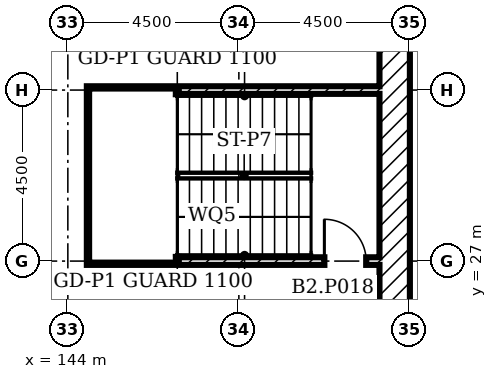
"""IFC4 building model, lengths in metres.
Left out: names, types, materials, properties, quantities, classifications, styles, units other than length and angle.
Written with IfcOpenShell. Run it as: python <this file> out.ifc"""

import sys

from ifc_helpers import new_model, si_unit, direction, frame, frame_2d, origin, place, context, subcontext, project, spatial, rectangle, extrude, element, fill, save


model = new_model("IFC4")
c1 = context("Model", 3, precision=1e-05, world=origin(), true_north=direction((0.0, 1.0)))
c2 = subcontext(c1, "Body", "Model", "MODEL_VIEW")
j1 = project(units=[si_unit("LENGTHUNIT", "METRE"), si_unit("PLANEANGLEUNIT", "RADIAN")], contexts=[c1])
p1 = place(None, origin())
s1 = spatial("IfcSite", under=j1, at=p1, CompositionType="ELEMENT")
p2 = place(p1, origin())
s2 = spatial("IfcBuilding", under=s1, at=p2, CompositionType="ELEMENT")
p3 = place(p2, frame((0.0, 0.0, -8.0)))
s3 = spatial("IfcBuildingStorey", under=s2, at=p3, CompositionType="ELEMENT", Elevation=-8.0)
p4 = place(p3, frame((152.6, 0.8, 0.0), z_axis=(0.0, 0.0, 1.0), x_axis=(0.0, 1.0, 0.0)))
e1 = element("IfcWall", 1, at=p4, inside=s3, PredefinedType="SOLIDWALL", context=c2, shape_type="SweptSolid", body=[
    extrude(rectangle(XDim=97.4, YDim=0.8, at=frame_2d((48.7, 0.0))), origin(), (0.0, 0.0, 1.0), 4.0),
])
p5 = place(p3, frame((144.6, 26.9, 0.0), z_axis=(0.0, 0.0, 1.0), x_axis=(0.0, 1.0, 0.0)))
e2 = element("IfcWall", 2, at=p5, inside=s3, PredefinedType="SOLIDWALL", context=c2, shape_type="SweptSolid", body=[
    extrude(rectangle(XDim=4.7, YDim=0.2, at=frame_2d((2.35, 0.0))), origin(), (0.0, 0.0, 1.0), 3.55),
])
p6 = place(p3, frame((144.7, 27.0, 0.0)))
e3 = element("IfcWall", 3, at=p6, inside=s3, PredefinedType="SOLIDWALL", context=c2, shape_type="SweptSolid", body=[
    extrude(rectangle(XDim=7.5, YDim=0.2, at=frame_2d((3.75, 0.0))), origin(), (0.0, 0.0, 1.0), 3.55),
])
p7 = place(p6, frame((6.05, 0.0, 0.0)))
e4 = element("IfcOpeningElement", 4, at=p7, cuts=e3, PredefinedType="OPENING", context=c2, shape_type="SweptSolid", body=[
    extrude(rectangle(XDim=1.1, YDim=2.1, at=frame_2d((0.55, 1.05))), frame((0.0, 0.11, 0.0), z_axis=(0.0, -1.0, 0.0), x_axis=(1.0, 0.0, 0.0)), (0.0, 0.0, 1.0), 0.22),
])
p8 = place(p3, frame((144.7, 31.5, 0.0)))
e5 = element("IfcWall", 5, at=p8, inside=s3, PredefinedType="SOLIDWALL", context=c2, shape_type="SweptSolid", body=[
    extrude(rectangle(XDim=7.5, YDim=0.2, at=frame_2d((3.75, 0.0))), origin(), (0.0, 0.0, 1.0), 3.55),
])
for number, where, z_axis, x_axis in (
    (6, (146.78, 27.1, 0.0), (0.0, 0.0, 1.0), (0.0, 1.0, 0.0)),
    (7, (145.3, 27.1, 0.0), (0.0, 0.0, 1.0), (0.0, 1.0, 0.0)),
):
    element("IfcWall", number, at=place(p3, frame(where, z_axis=z_axis, x_axis=x_axis)), inside=s3, PredefinedType="SOLIDWALL", context=c2, shape_type="SweptSolid", body=[
        extrude(rectangle(XDim=4.3, YDim=0.2, at=frame_2d((2.15, 0.0))), origin(), (0.0, 0.0, 1.0), 1.8),
    ])
p9 = place(p7, origin())
e8 = element("IfcDoor", 8, at=p9, inside=s3, OperationType="SINGLE_SWING_RIGHT", PredefinedType="DOOR", context=c2, shape_type="SweptSolid", body=[
    extrude(rectangle(XDim=1.1, YDim=2.1, at=frame_2d((0.55, 1.05))), frame((0.0, 0.025, 0.0), z_axis=(0.0, -1.0, 0.0), x_axis=(1.0, 0.0, 0.0)), (0.0, 0.0, 1.0), 0.05),
])
fill(e4, e8)
save(model, sys.argv[1])
